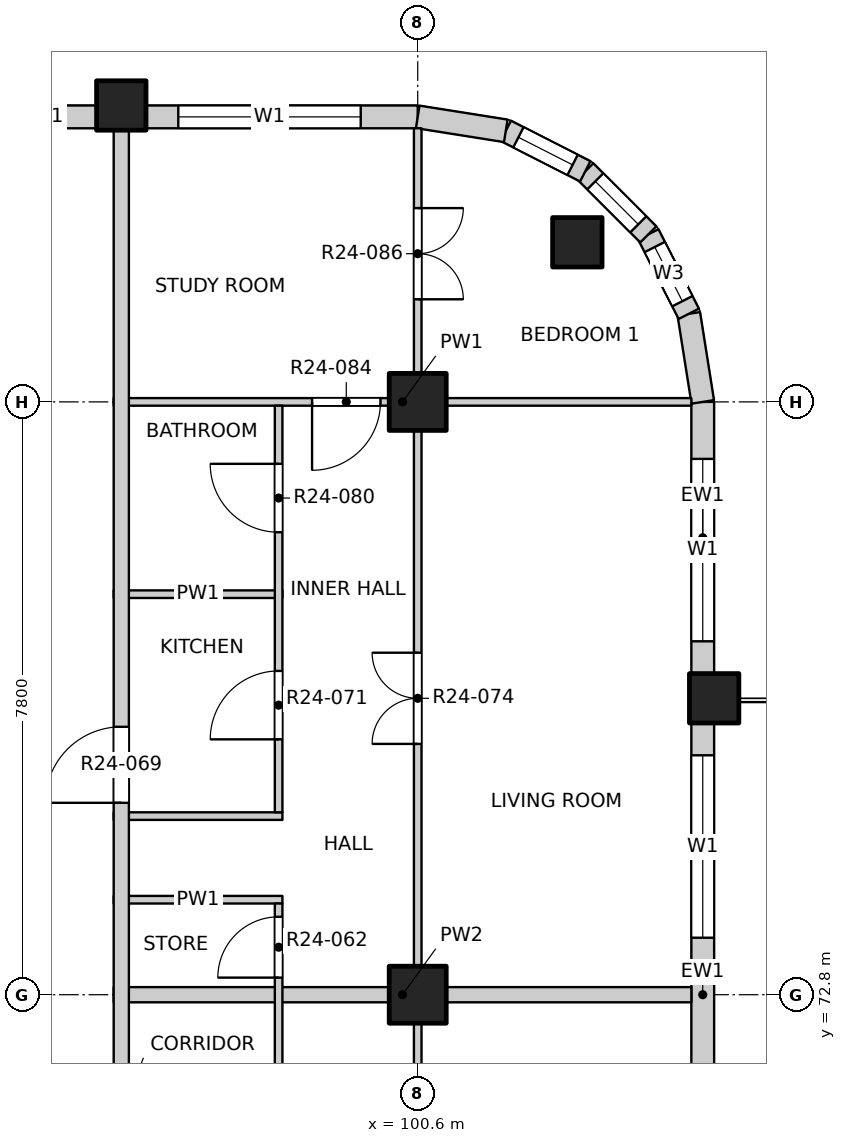
"""IFC4 building model, lengths in metres.
Left out: names, types, materials, properties, quantities, classifications, styles, units other than length and angle.
Written with IfcOpenShell. Run it as: python <this file> out.ifc"""

import sys

from ifc_helpers import new_model, si_unit, direction, frame, frame_2d, origin, origin_2d, place, context, subcontext, project, spatial, rectangle, extrude, element, fill, save


model = new_model("IFC4")
c1 = context("Model", 3, precision=1e-05, world=origin(), true_north=direction((0.0, 1.0)))
c2 = subcontext(c1, "Body", "Model", "MODEL_VIEW")
j1 = project(units=[si_unit("LENGTHUNIT", "METRE"), si_unit("PLANEANGLEUNIT", "RADIAN")], contexts=[c1])
p1 = place(None, origin())
s1 = spatial("IfcSite", under=j1, at=p1, CompositionType="ELEMENT")
p2 = place(p1, origin())
s2 = spatial("IfcBuilding", under=s1, at=p2, CompositionType="ELEMENT")
p3 = place(p2, frame((0.0, 0.0, 249.4)))
s3 = spatial("IfcBuildingStorey", under=s2, at=p3, CompositionType="ELEMENT", Elevation=249.4)
for number, where, z_axis, x_axis in (
    (1, (102.7, 82.7, -0.25), (0.0, 0.0, 1.0), (1.0, 0.0, 0.0)),
    (2, (104.5, 76.7, -0.25), (0.0, 0.0, 1.0), (1.0, 0.0, 0.0)),
    (3, (96.7, 84.5, -0.25), (0.0, 0.0, 1.0), (1.0, 0.0, 0.0)),
):
    element("IfcColumn", number, at=place(p3, frame(where, z_axis=z_axis, x_axis=x_axis)), inside=s3, PredefinedType="COLUMN", context=c2, shape_type="SweptSolid", body=[
        extrude(rectangle(XDim=0.65, YDim=0.65, at=origin_2d()), origin(), (0.0, 0.0, 1.0), 3.4),
    ])
for number, where, z_axis, x_axis in (
    (4, (100.6, 72.8, -0.25), (0.0, 0.0, 1.0), (1.0, 0.0, 0.0)),
    (5, (100.6, 80.6, -0.25), (0.0, 0.0, 1.0), (1.0, 0.0, 0.0)),
):
    element("IfcColumn", number, at=place(p3, frame(where, z_axis=z_axis, x_axis=x_axis)), inside=s3, PredefinedType="COLUMN", context=c2, shape_type="SweptSolid", body=[
        extrude(rectangle(XDim=0.75, YDim=0.75, at=origin_2d()), origin(), (0.0, 0.0, 1.0), 3.4),
    ])
p4 = place(p3, frame((104.35, 69.225, 0.0), z_axis=(0.0, 0.0, 1.0), x_axis=(0.0, 1.0, 0.0)))
e6 = element("IfcWall", 6, at=p4, inside=s3, PredefinedType="SOLIDWALL", context=c2, shape_type="SweptSolid", body=[
    extrude(rectangle(XDim=7.15, YDim=0.3, at=frame_2d((3.575, 0.0))), origin(), (0.0, 0.0, 1.0), 2.7),
])
p5 = place(p4, frame((0.725, 0.0, 0.0)))
e7 = element("IfcOpeningElement", 7, at=p5, cuts=e6, PredefinedType="OPENING", context=c2, shape_type="SweptSolid", body=[
    extrude(rectangle(XDim=1.8, YDim=2.4, at=frame_2d((0.9, 1.2))), frame((0.0, 0.16, 0.0), z_axis=(0.0, -1.0, 0.0), x_axis=(1.0, 0.0, 0.0)), (0.0, 0.0, 1.0), 0.32),
])
p6 = place(p4, frame((4.325, 0.0, 0.9)))
e8 = element("IfcOpeningElement", 8, at=p6, cuts=e6, PredefinedType="OPENING", context=c2, shape_type="SweptSolid", body=[
    extrude(rectangle(XDim=2.4, YDim=1.8, at=frame_2d((1.2, 0.9))), frame((0.0, 0.16, 0.0), z_axis=(0.0, -1.0, 0.0), x_axis=(1.0, 0.0, 0.0)), (0.0, 0.0, 1.0), 0.32),
])
p7 = place(p3, frame((104.35, 77.025, 0.0), z_axis=(0.0, 0.0, 1.0), x_axis=(0.0, 1.0, 0.0)))
e9 = element("IfcWall", 9, at=p7, inside=s3, PredefinedType="SOLIDWALL", context=c2, shape_type="SweptSolid", body=[
    extrude(rectangle(XDim=3.575, YDim=0.3, at=frame_2d((1.788, 0.0))), origin(), (0.0, 0.0, 1.0), 2.7),
])
p8 = place(p7, frame((0.425, 0.0, 0.9)))
e10 = element("IfcOpeningElement", 10, at=p8, cuts=e9, PredefinedType="OPENING", context=c2, shape_type="SweptSolid", body=[
    extrude(rectangle(XDim=2.4, YDim=1.8, at=frame_2d((1.2, 0.9))), frame((0.0, 0.16, 0.0), z_axis=(0.0, -1.0, 0.0), x_axis=(1.0, 0.0, 0.0)), (0.0, 0.0, 1.0), 0.32),
])
p9 = place(p3, frame((94.95, 84.35, 0.0), z_axis=(0.0, 0.0, 1.0), x_axis=(1.0, 0.0, 0.0)))
e11 = element("IfcWall", 11, at=p9, inside=s3, PredefinedType="SOLIDWALL", context=c2, shape_type="SweptSolid", body=[
    extrude(rectangle(XDim=1.425, YDim=0.3, at=frame_2d((0.712, 0.0))), origin(), (0.0, 0.0, 1.0), 2.7),
])
p10 = place(p3, frame((97.025, 84.35, 0.0), z_axis=(0.0, 0.0, 1.0), x_axis=(1.0, 0.0, 0.0)))
e12 = element("IfcWall", 12, at=p10, inside=s3, PredefinedType="SOLIDWALL", context=c2, shape_type="SweptSolid", body=[
    extrude(rectangle(XDim=3.575, YDim=0.3, at=frame_2d((1.788, 0.0))), origin(), (0.0, 0.0, 1.0), 2.7),
])
p11 = place(p10, frame((0.425, 0.0, 0.9)))
e13 = element("IfcOpeningElement", 13, at=p11, cuts=e12, PredefinedType="OPENING", context=c2, shape_type="SweptSolid", body=[
    extrude(rectangle(XDim=2.4, YDim=1.8, at=frame_2d((1.2, 0.9))), frame((0.0, 0.16, 0.0), z_axis=(0.0, -1.0, 0.0), x_axis=(1.0, 0.0, 0.0)), (0.0, 0.0, 1.0), 0.32),
])
p12 = place(p3, frame((104.35, 80.6, 0.0), z_axis=(0.0, 0.0, 1.0), x_axis=(-0.156496880861, 0.987678452879, 0.0)))
e14 = element("IfcWall", 14, at=p12, inside=s3, PredefinedType="SOLIDWALL", context=c2, shape_type="SweptSolid", body=[
    extrude(rectangle(XDim=1.173, YDim=0.3, at=frame_2d((0.586, 0.0))), origin(), (0.0, 0.0, 1.0), 2.7),
])
p13 = place(p3, frame((104.167, 81.759, 0.0), z_axis=(0.0, 0.0, 1.0), x_axis=(-0.454025524128, 0.890988677504, 0.0)))
e15 = element("IfcWall", 15, at=p13, inside=s3, PredefinedType="SOLIDWALL", context=c2, shape_type="SweptSolid", body=[
    extrude(rectangle(XDim=1.173, YDim=0.3, at=frame_2d((0.587, 0.0))), origin(), (0.0, 0.0, 1.0), 2.7),
])
p14 = place(p13, frame((0.187, 0.0, 0.9)))
e16 = element("IfcOpeningElement", 16, at=p14, cuts=e15, PredefinedType="OPENING", context=c2, shape_type="SweptSolid", body=[
    extrude(rectangle(XDim=0.8, YDim=1.2, at=frame_2d((0.4, 0.6))), frame((0.0, 0.16, 0.0), z_axis=(0.0, -1.0, 0.0), x_axis=(1.0, 0.0, 0.0)), (0.0, 0.0, 1.0), 0.32),
])
p15 = place(p3, frame((103.634, 82.804, 0.0), z_axis=(0.0, 0.0, 1.0), x_axis=(-0.707106781187, 0.707106781187, 0.0)))
e17 = element("IfcWall", 17, at=p15, inside=s3, PredefinedType="SOLIDWALL", context=c2, shape_type="SweptSolid", body=[
    extrude(rectangle(XDim=1.173, YDim=0.3, at=frame_2d((0.586, 0.0))), origin(), (0.0, 0.0, 1.0), 2.7),
])
p16 = place(p15, frame((0.187, 0.0, 0.9)))
e18 = element("IfcOpeningElement", 18, at=p16, cuts=e17, PredefinedType="OPENING", context=c2, shape_type="SweptSolid", body=[
    extrude(rectangle(XDim=0.8, YDim=1.2, at=frame_2d((0.4, 0.6))), frame((0.0, 0.16, 0.0), z_axis=(0.0, -1.0, 0.0), x_axis=(1.0, 0.0, 0.0)), (0.0, 0.0, 1.0), 0.32),
])
p17 = place(p3, frame((102.804, 83.634, 0.0), z_axis=(0.0, 0.0, 1.0), x_axis=(-0.890988677504, 0.454025524128, 0.0)))
e19 = element("IfcWall", 19, at=p17, inside=s3, PredefinedType="SOLIDWALL", context=c2, shape_type="SweptSolid", body=[
    extrude(rectangle(XDim=1.173, YDim=0.3, at=frame_2d((0.587, 0.0))), origin(), (0.0, 0.0, 1.0), 2.7),
])
p18 = place(p17, frame((0.187, 0.0, 0.9)))
e20 = element("IfcOpeningElement", 20, at=p18, cuts=e19, PredefinedType="OPENING", context=c2, shape_type="SweptSolid", body=[
    extrude(rectangle(XDim=0.8, YDim=1.2, at=frame_2d((0.4, 0.6))), frame((0.0, 0.16, 0.0), z_axis=(0.0, -1.0, 0.0), x_axis=(1.0, 0.0, 0.0)), (0.0, 0.0, 1.0), 0.32),
])
p19 = place(p3, frame((101.759, 84.167, 0.0), z_axis=(0.0, 0.0, 1.0), x_axis=(-0.987678452879, 0.156496880861, 0.0)))
e21 = element("IfcWall", 21, at=p19, inside=s3, PredefinedType="SOLIDWALL", context=c2, shape_type="SweptSolid", body=[
    extrude(rectangle(XDim=1.173, YDim=0.3, at=frame_2d((0.586, 0.0))), origin(), (0.0, 0.0, 1.0), 2.7),
])
p20 = place(p3, frame((96.6, 72.8, 0.0), z_axis=(0.0, 0.0, 1.0), x_axis=(1.0, 0.0, 0.0)))
e22 = element("IfcWall", 22, at=p20, inside=s3, PredefinedType="PARTITIONING", context=c2, shape_type="SweptSolid", body=[
    extrude(rectangle(XDim=7.6, YDim=0.2, at=frame_2d((3.8, 0.0))), origin(), (0.0, 0.0, 1.0), 3.15),
])
for number, where, z_axis, x_axis in (
    (23, (96.6, 74.05, 0.0), (0.0, 0.0, 1.0), (1.0, 0.0, 0.0)),
    (24, (96.6, 75.15, 0.0), (0.0, 0.0, 1.0), (1.0, 0.0, 0.0)),
    (25, (96.6, 78.07, 0.0), (0.0, 0.0, 1.0), (1.0, 0.0, 0.0)),
):
    element("IfcWall", number, at=place(p3, frame(where, z_axis=z_axis, x_axis=x_axis)), inside=s3, PredefinedType="PARTITIONING", context=c2, shape_type="SweptSolid", body=[
        extrude(rectangle(XDim=2.22, YDim=0.1, at=frame_2d((1.11, 0.0))), origin(), (0.0, 0.0, 1.0), 3.15),
    ])
p21 = place(p3, frame((96.6, 80.6, 0.0), z_axis=(0.0, 0.0, 1.0), x_axis=(1.0, 0.0, 0.0)))
e26 = element("IfcWall", 26, at=p21, inside=s3, PredefinedType="PARTITIONING", context=c2, shape_type="SweptSolid", body=[
    extrude(rectangle(XDim=7.6, YDim=0.1, at=frame_2d((3.8, 0.0))), origin(), (0.0, 0.0, 1.0), 3.15),
])
p22 = place(p21, frame((2.61, 0.0, 0.0)))
e27 = element("IfcOpeningElement", 27, at=p22, cuts=e26, PredefinedType="OPENING", context=c2, shape_type="SweptSolid", body=[
    extrude(rectangle(XDim=0.9, YDim=2.1, at=frame_2d((0.45, 1.05))), frame((0.0, 0.06, 0.0), z_axis=(0.0, -1.0, 0.0), x_axis=(1.0, 0.0, 0.0)), (0.0, 0.0, 1.0), 0.12),
])
p23 = place(p3, frame((96.7, 49.5, 0.0), z_axis=(0.0, 0.0, 1.0), x_axis=(0.0, 1.0, 0.0)))
e28 = element("IfcWall", 28, at=p23, inside=s3, PredefinedType="PARTITIONING", context=c2, shape_type="SweptSolid", body=[
    extrude(rectangle(XDim=34.7, YDim=0.2, at=frame_2d((17.35, 0.0))), origin(), (0.0, 0.0, 1.0), 3.15),
])
p24 = place(p23, frame((3.075, 0.0, 0.0)))
e29 = element("IfcOpeningElement", 29, at=p24, cuts=e28, PredefinedType="OPENING", context=c2, shape_type="SweptSolid", body=[
    extrude(rectangle(XDim=1.0, YDim=2.1, at=frame_2d((0.5, 1.05))), frame((0.0, 0.11, 0.0), z_axis=(0.0, -1.0, 0.0), x_axis=(1.0, 0.0, 0.0)), (0.0, 0.0, 1.0), 0.22),
])
p25 = place(p23, frame((18.425, 0.0, 0.0)))
e30 = element("IfcOpeningElement", 30, at=p25, cuts=e28, PredefinedType="OPENING", context=c2, shape_type="SweptSolid", body=[
    extrude(rectangle(XDim=1.0, YDim=2.1, at=frame_2d((0.5, 1.05))), frame((0.0, 0.11, 0.0), z_axis=(0.0, -1.0, 0.0), x_axis=(1.0, 0.0, 0.0)), (0.0, 0.0, 1.0), 0.22),
])
p26 = place(p23, frame((25.825, 0.0, 0.0)))
e31 = element("IfcOpeningElement", 31, at=p26, cuts=e28, PredefinedType="OPENING", context=c2, shape_type="SweptSolid", body=[
    extrude(rectangle(XDim=1.0, YDim=2.1, at=frame_2d((0.5, 1.05))), frame((0.0, 0.11, 0.0), z_axis=(0.0, -1.0, 0.0), x_axis=(1.0, 0.0, 0.0)), (0.0, 0.0, 1.0), 0.22),
])
p27 = place(p3, frame((98.77, 67.8, 0.0), z_axis=(0.0, 0.0, 1.0), x_axis=(0.0, 1.0, 0.0)))
e32 = element("IfcWall", 32, at=p27, inside=s3, PredefinedType="PARTITIONING", context=c2, shape_type="SweptSolid", body=[
    extrude(rectangle(XDim=6.2, YDim=0.1, at=frame_2d((3.1, 0.0))), origin(), (0.0, 0.0, 1.0), 3.15),
])
p28 = place(p27, frame((0.69, 0.0, 0.0)))
e33 = element("IfcOpeningElement", 33, at=p28, cuts=e32, PredefinedType="OPENING", context=c2, shape_type="SweptSolid", body=[
    extrude(rectangle(XDim=0.8, YDim=2.1, at=frame_2d((0.4, 1.05))), frame((0.0, 0.06, 0.0), z_axis=(0.0, -1.0, 0.0), x_axis=(1.0, 0.0, 0.0)), (0.0, 0.0, 1.0), 0.12),
])
p29 = place(p27, frame((3.165, 0.0, 0.0)))
e34 = element("IfcOpeningElement", 34, at=p29, cuts=e32, PredefinedType="OPENING", context=c2, shape_type="SweptSolid", body=[
    extrude(rectangle(XDim=0.9, YDim=2.1, at=frame_2d((0.45, 1.05))), frame((0.0, 0.06, 0.0), z_axis=(0.0, -1.0, 0.0), x_axis=(1.0, 0.0, 0.0)), (0.0, 0.0, 1.0), 0.12),
])
p30 = place(p27, frame((5.225, 0.0, 0.0)))
e35 = element("IfcOpeningElement", 35, at=p30, cuts=e32, PredefinedType="OPENING", context=c2, shape_type="SweptSolid", body=[
    extrude(rectangle(XDim=0.8, YDim=2.1, at=frame_2d((0.4, 1.05))), frame((0.0, 0.06, 0.0), z_axis=(0.0, -1.0, 0.0), x_axis=(1.0, 0.0, 0.0)), (0.0, 0.0, 1.0), 0.12),
])
p31 = place(p3, frame((98.77, 75.2, 0.0), z_axis=(0.0, 0.0, 1.0), x_axis=(0.0, 1.0, 0.0)))
e36 = element("IfcWall", 36, at=p31, inside=s3, PredefinedType="PARTITIONING", context=c2, shape_type="SweptSolid", body=[
    extrude(rectangle(XDim=5.35, YDim=0.1, at=frame_2d((2.675, 0.0))), origin(), (0.0, 0.0, 1.0), 3.15),
])
p32 = place(p31, frame((0.96, 0.0, 0.0)))
e37 = element("IfcOpeningElement", 37, at=p32, cuts=e36, PredefinedType="OPENING", context=c2, shape_type="SweptSolid", body=[
    extrude(rectangle(XDim=0.9, YDim=2.1, at=frame_2d((0.45, 1.05))), frame((0.0, 0.06, 0.0), z_axis=(0.0, -1.0, 0.0), x_axis=(1.0, 0.0, 0.0)), (0.0, 0.0, 1.0), 0.12),
])
p33 = place(p31, frame((3.685, 0.0, 0.0)))
e38 = element("IfcOpeningElement", 38, at=p33, cuts=e36, PredefinedType="OPENING", context=c2, shape_type="SweptSolid", body=[
    extrude(rectangle(XDim=0.9, YDim=2.1, at=frame_2d((0.45, 1.05))), frame((0.0, 0.06, 0.0), z_axis=(0.0, -1.0, 0.0), x_axis=(1.0, 0.0, 0.0)), (0.0, 0.0, 1.0), 0.12),
])
p34 = place(p3, frame((100.6, 45.8, 0.0), z_axis=(0.0, 0.0, 1.0), x_axis=(0.0, 1.0, 0.0)))
e39 = element("IfcWall", 39, at=p34, inside=s3, PredefinedType="PARTITIONING", context=c2, shape_type="SweptSolid", body=[
    extrude(rectangle(XDim=38.4, YDim=0.1, at=frame_2d((19.2, 0.0))), origin(), (0.0, 0.0, 1.0), 3.15),
])
p35 = place(p34, frame((1.05, 0.0, 0.0)))
e40 = element("IfcOpeningElement", 40, at=p35, cuts=e39, PredefinedType="OPENING", context=c2, shape_type="SweptSolid", body=[
    extrude(rectangle(XDim=1.2, YDim=2.1, at=frame_2d((0.6, 1.05))), frame((0.0, 0.06, 0.0), z_axis=(0.0, -1.0, 0.0), x_axis=(1.0, 0.0, 0.0)), (0.0, 0.0, 1.0), 0.12),
])
p36 = place(p34, frame((6.9, 0.0, 0.0)))
e41 = element("IfcOpeningElement", 41, at=p36, cuts=e39, PredefinedType="OPENING", context=c2, shape_type="SweptSolid", body=[
    extrude(rectangle(XDim=1.2, YDim=2.1, at=frame_2d((0.6, 1.05))), frame((0.0, 0.06, 0.0), z_axis=(0.0, -1.0, 0.0), x_axis=(1.0, 0.0, 0.0)), (0.0, 0.0, 1.0), 0.12),
])
p37 = place(p34, frame((12.9, 0.0, 0.0)))
e42 = element("IfcOpeningElement", 42, at=p37, cuts=e39, PredefinedType="OPENING", context=c2, shape_type="SweptSolid", body=[
    extrude(rectangle(XDim=0.9, YDim=2.1, at=frame_2d((0.45, 1.05))), frame((0.0, 0.06, 0.0), z_axis=(0.0, -1.0, 0.0), x_axis=(1.0, 0.0, 0.0)), (0.0, 0.0, 1.0), 0.12),
])
p38 = place(p34, frame((16.8, 0.0, 0.0)))
e43 = element("IfcOpeningElement", 43, at=p38, cuts=e39, PredefinedType="OPENING", context=c2, shape_type="SweptSolid", body=[
    extrude(rectangle(XDim=0.9, YDim=2.1, at=frame_2d((0.45, 1.05))), frame((0.0, 0.06, 0.0), z_axis=(0.0, -1.0, 0.0), x_axis=(1.0, 0.0, 0.0)), (0.0, 0.0, 1.0), 0.12),
])
p39 = place(p34, frame((20.7, 0.0, 0.0)))
e44 = element("IfcOpeningElement", 44, at=p39, cuts=e39, PredefinedType="OPENING", context=c2, shape_type="SweptSolid", body=[
    extrude(rectangle(XDim=0.9, YDim=2.1, at=frame_2d((0.45, 1.05))), frame((0.0, 0.06, 0.0), z_axis=(0.0, -1.0, 0.0), x_axis=(1.0, 0.0, 0.0)), (0.0, 0.0, 1.0), 0.12),
])
p40 = place(p34, frame((24.6, 0.0, 0.0)))
e45 = element("IfcOpeningElement", 45, at=p40, cuts=e39, PredefinedType="OPENING", context=c2, shape_type="SweptSolid", body=[
    extrude(rectangle(XDim=0.9, YDim=2.1, at=frame_2d((0.45, 1.05))), frame((0.0, 0.06, 0.0), z_axis=(0.0, -1.0, 0.0), x_axis=(1.0, 0.0, 0.0)), (0.0, 0.0, 1.0), 0.12),
])
p41 = place(p34, frame((30.3, 0.0, 0.0)))
e46 = element("IfcOpeningElement", 46, at=p41, cuts=e39, PredefinedType="OPENING", context=c2, shape_type="SweptSolid", body=[
    extrude(rectangle(XDim=1.2, YDim=2.1, at=frame_2d((0.6, 1.05))), frame((0.0, 0.06, 0.0), z_axis=(0.0, -1.0, 0.0), x_axis=(1.0, 0.0, 0.0)), (0.0, 0.0, 1.0), 0.12),
])
p42 = place(p34, frame((36.15, 0.0, 0.0)))
e47 = element("IfcOpeningElement", 47, at=p42, cuts=e39, PredefinedType="OPENING", context=c2, shape_type="SweptSolid", body=[
    extrude(rectangle(XDim=1.2, YDim=2.1, at=frame_2d((0.6, 1.05))), frame((0.0, 0.06, 0.0), z_axis=(0.0, -1.0, 0.0), x_axis=(1.0, 0.0, 0.0)), (0.0, 0.0, 1.0), 0.12),
])
p43 = place(p6, origin())
e48 = element("IfcWindow", 48, at=p43, inside=s3, PartitioningType="DOUBLE_PANEL_VERTICAL", PredefinedType="WINDOW", context=c2, shape_type="SweptSolid", body=[
    extrude(rectangle(XDim=2.4, YDim=1.8, at=frame_2d((1.2, 0.9))), frame((0.0, 0.03, 0.0), z_axis=(0.0, -1.0, 0.0), x_axis=(1.0, 0.0, 0.0)), (0.0, 0.0, 1.0), 0.06),
])
fill(e8, e48)
p44 = place(p8, origin())
e49 = element("IfcWindow", 49, at=p44, inside=s3, PartitioningType="DOUBLE_PANEL_VERTICAL", PredefinedType="WINDOW", context=c2, shape_type="SweptSolid", body=[
    extrude(rectangle(XDim=2.4, YDim=1.8, at=frame_2d((1.2, 0.9))), frame((0.0, 0.03, 0.0), z_axis=(0.0, -1.0, 0.0), x_axis=(1.0, 0.0, 0.0)), (0.0, 0.0, 1.0), 0.06),
])
fill(e10, e49)
p45 = place(p11, origin())
e50 = element("IfcWindow", 50, at=p45, inside=s3, PartitioningType="DOUBLE_PANEL_VERTICAL", PredefinedType="WINDOW", context=c2, shape_type="SweptSolid", body=[
    extrude(rectangle(XDim=2.4, YDim=1.8, at=frame_2d((1.2, 0.9))), frame((0.0, 0.03, 0.0), z_axis=(0.0, -1.0, 0.0), x_axis=(1.0, 0.0, 0.0)), (0.0, 0.0, 1.0), 0.06),
])
fill(e13, e50)
p46 = place(p14, origin())
e51 = element("IfcWindow", 51, at=p46, inside=s3, PartitioningType="SINGLE_PANEL", PredefinedType="WINDOW", context=c2, shape_type="SweptSolid", body=[
    extrude(rectangle(XDim=0.8, YDim=1.2, at=frame_2d((0.4, 0.6))), frame((0.0, 0.03, 0.0), z_axis=(0.0, -1.0, 0.0), x_axis=(1.0, 0.0, 0.0)), (0.0, 0.0, 1.0), 0.06),
])
fill(e16, e51)
p47 = place(p16, origin())
e52 = element("IfcWindow", 52, at=p47, inside=s3, PartitioningType="SINGLE_PANEL", PredefinedType="WINDOW", context=c2, shape_type="SweptSolid", body=[
    extrude(rectangle(XDim=0.8, YDim=1.2, at=frame_2d((0.4, 0.6))), frame((0.0, 0.03, 0.0), z_axis=(0.0, -1.0, 0.0), x_axis=(1.0, 0.0, 0.0)), (0.0, 0.0, 1.0), 0.06),
])
fill(e18, e52)
p48 = place(p18, origin())
e53 = element("IfcWindow", 53, at=p48, inside=s3, PartitioningType="SINGLE_PANEL", PredefinedType="WINDOW", context=c2, shape_type="SweptSolid", body=[
    extrude(rectangle(XDim=0.8, YDim=1.2, at=frame_2d((0.4, 0.6))), frame((0.0, 0.03, 0.0), z_axis=(0.0, -1.0, 0.0), x_axis=(1.0, 0.0, 0.0)), (0.0, 0.0, 1.0), 0.06),
])
fill(e20, e53)
p49 = place(p30, origin())
e54 = element("IfcDoor", 54, at=p49, inside=s3, OperationType="SINGLE_SWING_LEFT", PredefinedType="DOOR", context=c2, shape_type="SweptSolid", body=[
    extrude(rectangle(XDim=0.8, YDim=2.1, at=frame_2d((0.4, 1.05))), frame((0.0, 0.025, 0.0), z_axis=(0.0, -1.0, 0.0), x_axis=(1.0, 0.0, 0.0)), (0.0, 0.0, 1.0), 0.05),
])
fill(e35, e54)
p50 = place(p26, origin())
e55 = element("IfcDoor", 55, at=p50, inside=s3, OperationType="SINGLE_SWING_LEFT", PredefinedType="DOOR", context=c2, shape_type="SweptSolid", body=[
    extrude(rectangle(XDim=1.0, YDim=2.1, at=frame_2d((0.5, 1.05))), frame((0.0, 0.025, 0.0), z_axis=(0.0, -1.0, 0.0), x_axis=(1.0, 0.0, 0.0)), (0.0, 0.0, 1.0), 0.05),
])
fill(e31, e55)
p51 = place(p32, origin())
e56 = element("IfcDoor", 56, at=p51, inside=s3, OperationType="SINGLE_SWING_LEFT", PredefinedType="DOOR", context=c2, shape_type="SweptSolid", body=[
    extrude(rectangle(XDim=0.9, YDim=2.1, at=frame_2d((0.45, 1.05))), frame((0.0, 0.025, 0.0), z_axis=(0.0, -1.0, 0.0), x_axis=(1.0, 0.0, 0.0)), (0.0, 0.0, 1.0), 0.05),
])
fill(e37, e56)
p52 = place(p41, origin())
e57 = element("IfcDoor", 57, at=p52, inside=s3, OperationType="DOUBLE_DOOR_SINGLE_SWING", PredefinedType="DOOR", context=c2, shape_type="SweptSolid", body=[
    extrude(rectangle(XDim=1.2, YDim=2.1, at=frame_2d((0.6, 1.05))), frame((0.0, 0.025, 0.0), z_axis=(0.0, -1.0, 0.0), x_axis=(1.0, 0.0, 0.0)), (0.0, 0.0, 1.0), 0.05),
])
fill(e46, e57)
p53 = place(p33, origin())
e58 = element("IfcDoor", 58, at=p53, inside=s3, OperationType="SINGLE_SWING_RIGHT", PredefinedType="DOOR", context=c2, shape_type="SweptSolid", body=[
    extrude(rectangle(XDim=0.9, YDim=2.1, at=frame_2d((0.45, 1.05))), frame((0.0, 0.025, 0.0), z_axis=(0.0, -1.0, 0.0), x_axis=(1.0, 0.0, 0.0)), (0.0, 0.0, 1.0), 0.05),
])
fill(e38, e58)
p54 = place(p22, origin())
e59 = element("IfcDoor", 59, at=p54, inside=s3, OperationType="SINGLE_SWING_RIGHT", PredefinedType="DOOR", context=c2, shape_type="SweptSolid", body=[
    extrude(rectangle(XDim=0.9, YDim=2.1, at=frame_2d((0.45, 1.05))), frame((0.0, 0.025, 0.0), z_axis=(0.0, -1.0, 0.0), x_axis=(1.0, 0.0, 0.0)), (0.0, 0.0, 1.0), 0.05),
])
fill(e27, e59)
p55 = place(p42, origin())
e60 = element("IfcDoor", 60, at=p55, inside=s3, OperationType="DOUBLE_DOOR_SINGLE_SWING", PredefinedType="DOOR", context=c2, shape_type="SweptSolid", body=[
    extrude(rectangle(XDim=1.2, YDim=2.1, at=frame_2d((0.6, 1.05))), frame((0.0, 0.025, 0.0), z_axis=(0.0, -1.0, 0.0), x_axis=(1.0, 0.0, 0.0)), (0.0, 0.0, 1.0), 0.05),
])
fill(e47, e60)
save(model, sys.argv[1])
